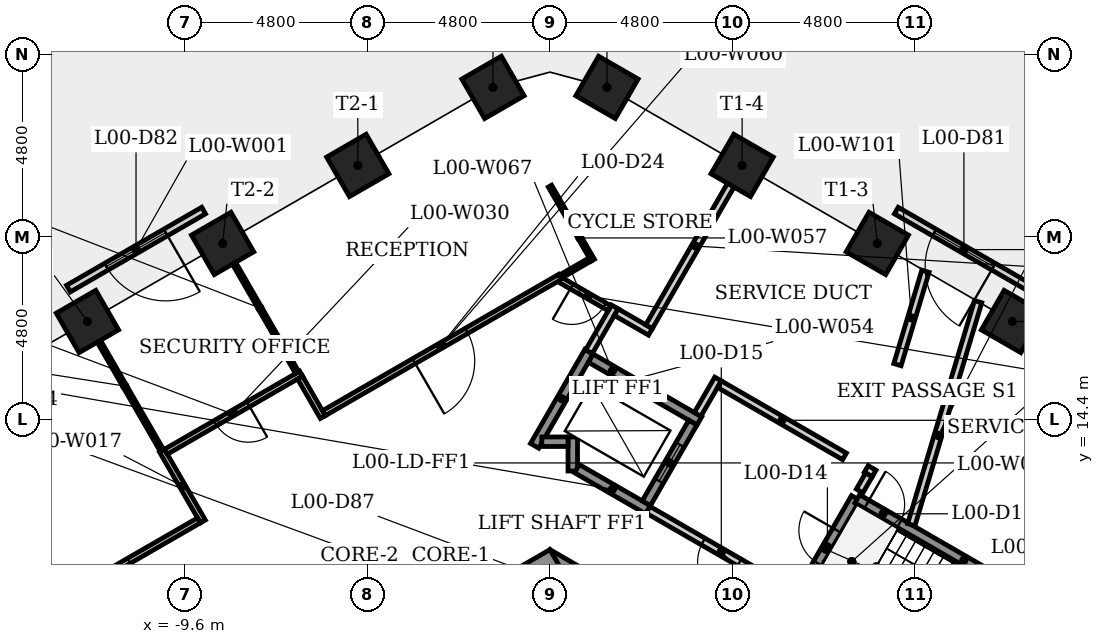
"""IFC4 building model, lengths in metres.
Left out: names, types, materials, properties, quantities, classifications, styles, units other than length and angle.
Written with IfcOpenShell. Run it as: python <this file> out.ifc"""

import sys

from ifc_helpers import new_model, si_unit, direction, frame, frame_2d, origin, origin_2d, place, context, subcontext, project, spatial, rectangle, extrude, element, fill, save


model = new_model("IFC4")
c1 = context("Model", 3, precision=1e-05, world=origin(), true_north=direction((0.0, 1.0)))
c2 = subcontext(c1, "Body", "Model", "MODEL_VIEW")
j1 = project(units=[si_unit("LENGTHUNIT", "METRE"), si_unit("PLANEANGLEUNIT", "RADIAN")], contexts=[c1])
p1 = place(None, origin())
s1 = spatial("IfcSite", under=j1, at=p1, CompositionType="ELEMENT")
p2 = place(p1, origin())
s2 = spatial("IfcBuilding", under=s1, at=p2, CompositionType="ELEMENT")
p3 = place(p2, origin())
s3 = spatial("IfcBuildingStorey", under=s2, at=p3, CompositionType="ELEMENT", Elevation=0.0)
p4 = place(p3, frame((9.3, 5.138, -0.5), z_axis=(0.0, 0.0, 1.0), x_axis=(-0.866023993627, 0.500002442456, 0.0)))
e1 = element("IfcWall", 1, at=p4, inside=s3, PredefinedType="SHEAR", context=c2, shape_type="SweptSolid", body=[
    extrude(rectangle(XDim=10.97, YDim=0.8, at=frame_2d((5.485, 0.0))), origin(), (0.0, 0.0, 1.0), 7.5),
])
p5 = place(p4, frame((8.21, 0.0, 0.5)))
e2 = element("IfcOpeningElement", 2, at=p5, cuts=e1, PredefinedType="OPENING", context=c2, shape_type="SweptSolid", body=[
    extrude(rectangle(XDim=0.9, YDim=2.1, at=frame_2d((0.45, 1.05))), frame((0.0, 0.41, 0.0), z_axis=(0.0, -1.0, 0.0), x_axis=(1.0, 0.0, 0.0)), (0.0, 0.0, 1.0), 0.82),
])
p6 = place(p4, frame((2.126, 0.0, 0.5)))
e3 = element("IfcOpeningElement", 3, at=p6, cuts=e1, PredefinedType="OPENING", context=c2, shape_type="SweptSolid", body=[
    extrude(rectangle(XDim=0.9, YDim=2.1, at=frame_2d((0.45, 1.05))), frame((0.0, 0.41, 0.0), z_axis=(0.0, -1.0, 0.0), x_axis=(1.0, 0.0, 0.0)), (0.0, 0.0, 1.0), 0.82),
])
p7 = place(p3, frame((0.2, 10.623, -0.5), z_axis=(0.0, 0.0, 1.0), x_axis=(-0.866023993627, -0.500002442456, 0.0)))
e4 = element("IfcWall", 4, at=p7, inside=s3, PredefinedType="SHEAR", context=c2, shape_type="SweptSolid", body=[
    extrude(rectangle(XDim=10.97, YDim=0.8, at=frame_2d((5.485, 0.0))), origin(), (0.0, 0.0, 1.0), 7.5),
])
p8 = place(p7, frame((6.877, 0.0, 0.5)))
e5 = element("IfcOpeningElement", 5, at=p8, cuts=e4, PredefinedType="OPENING", context=c2, shape_type="SweptSolid", body=[
    extrude(rectangle(XDim=0.9, YDim=2.1, at=frame_2d((0.45, 1.05))), frame((0.0, 0.41, 0.0), z_axis=(0.0, -1.0, 0.0), x_axis=(1.0, 0.0, 0.0)), (0.0, 0.0, 1.0), 0.82),
])
for number, where, z_axis, x_axis in (
    (6, (12.171, 16.973, -0.5), (0.0, 0.0, 1.0), (0.5, 0.866, 0.0)),
    (7, (8.614, 19.027, -0.5), (0.0, 0.0, 1.0), (0.5, 0.866, 0.0)),
    (8, (5.057, 21.08, -0.5), (0.0, 0.0, 1.0), (0.5, 0.866, 0.0)),
    (9, (1.5, 23.134, -0.5), (0.0, 0.0, 1.0), (0.5, 0.866, 0.0)),
    (10, (-1.5, 23.134, -0.5), (0.0, 0.0, 1.0), (-0.5, 0.866, 0.0)),
    (11, (-5.057, 21.08, -0.5), (0.0, 0.0, 1.0), (-0.5, 0.866, 0.0)),
    (12, (-8.614, 19.027, -0.5), (0.0, 0.0, 1.0), (-0.5, 0.866, 0.0)),
    (13, (-12.171, 16.973, -0.5), (0.0, 0.0, 1.0), (-0.5, 0.866, 0.0)),
):
    element("IfcColumn", number, at=place(p3, frame(where, z_axis=z_axis, x_axis=x_axis)), inside=s3, PredefinedType="COLUMN", context=c2, shape_type="SweptSolid", body=[
        extrude(rectangle(XDim=1.2, YDim=1.2, at=origin_2d()), origin(), (0.0, 0.0, 1.0), 7.5),
    ])
p9 = place(p3, frame((-9.114, 19.893, 0.0), z_axis=(0.0, 0.0, 1.0), x_axis=(-0.866036113234, -0.499981450231, 0.0)))
e14 = element("IfcWall", 14, at=p9, inside=s3, PredefinedType="SOLIDWALL", context=c2, shape_type="SweptSolid", body=[
    extrude(rectangle(XDim=4.107, YDim=0.2, at=frame_2d((2.054, 0.0))), origin(), (0.0, 0.0, 1.0), 7.0),
])
p10 = place(p9, frame((1.154, 0.0, 0.0)))
e15 = element("IfcOpeningElement", 15, at=p10, cuts=e14, PredefinedType="OPENING", context=c2, shape_type="SweptSolid", body=[
    extrude(rectangle(XDim=1.8, YDim=2.6, at=frame_2d((0.9, 1.3))), frame((0.0, 0.11, 0.0), z_axis=(0.0, -1.0, 0.0), x_axis=(1.0, 0.0, 0.0)), (0.0, 0.0, 1.0), 0.22),
])
p11 = place(p9, frame((1.154, 0.0, 3.0)))
e16 = element("IfcOpeningElement", 16, at=p11, cuts=e14, PredefinedType="OPENING", context=c2, shape_type="SweptSolid", body=[
    extrude(rectangle(XDim=1.8, YDim=2.2, at=frame_2d((0.9, 1.1))), frame((0.0, 0.11, 0.0), z_axis=(0.0, -1.0, 0.0), x_axis=(1.0, 0.0, 0.0)), (0.0, 0.0, 1.0), 0.22),
])
p12 = place(p3, frame((12.671, 17.839, 0.0), z_axis=(0.0, 0.0, 1.0), x_axis=(-0.865995510393, 0.500051773299, 0.0)))
e17 = element("IfcWall", 17, at=p12, inside=s3, PredefinedType="SOLIDWALL", context=c2, shape_type="SweptSolid", body=[
    extrude(rectangle(XDim=4.107, YDim=0.2, at=frame_2d((2.053, 0.0))), origin(), (0.0, 0.0, 1.0), 7.0),
])
p13 = place(p12, frame((1.154, 0.0, 0.0)))
e18 = element("IfcOpeningElement", 18, at=p13, cuts=e17, PredefinedType="OPENING", context=c2, shape_type="SweptSolid", body=[
    extrude(rectangle(XDim=1.8, YDim=2.6, at=frame_2d((0.9, 1.3))), frame((0.0, 0.11, 0.0), z_axis=(0.0, -1.0, 0.0), x_axis=(1.0, 0.0, 0.0)), (0.0, 0.0, 1.0), 0.22),
])
p14 = place(p12, frame((1.154, 0.0, 3.0)))
e19 = element("IfcOpeningElement", 19, at=p14, cuts=e17, PredefinedType="OPENING", context=c2, shape_type="SweptSolid", body=[
    extrude(rectangle(XDim=1.8, YDim=2.2, at=frame_2d((0.9, 1.1))), frame((0.0, 0.11, 0.0), z_axis=(0.0, -1.0, 0.0), x_axis=(1.0, 0.0, 0.0)), (0.0, 0.0, 1.0), 0.22),
])
p15 = place(p3, frame((-10.208, 13.574, 0.0), z_axis=(0.0, 0.0, 1.0), x_axis=(0.499961633463, -0.866047553582, 0.0)))
e20 = element("IfcWall", 20, at=p15, inside=s3, PredefinedType="PARTITIONING", context=c2, shape_type="SweptSolid", body=[
    extrude(rectangle(XDim=2.15, YDim=0.15, at=frame_2d((1.075, 0.0))), origin(), (0.0, 0.0, 1.0), 6.6),
])
p16 = place(p3, frame((-10.208, 13.574, 0.0), z_axis=(0.0, 0.0, 1.0), x_axis=(-0.500052695525, 0.865994977871, 0.0)))
e21 = element("IfcWall", 21, at=p16, inside=s3, PredefinedType="PARTITIONING", context=c2, shape_type="SweptSolid", body=[
    extrude(rectangle(XDim=3.925, YDim=0.1, at=frame_2d((1.962, 0.0))), origin(), (0.0, 0.0, 1.0), 6.6),
])
p17 = place(p3, frame((-9.236, 11.74, 0.0), z_axis=(0.0, 0.0, 1.0), x_axis=(-0.86604190943, -0.499971410293, 0.0)))
e22 = element("IfcWall", 22, at=p17, inside=s3, PredefinedType="PARTITIONING", context=c2, shape_type="SweptSolid", body=[
    extrude(rectangle(XDim=8.064, YDim=0.15, at=frame_2d((4.032, 0.0))), origin(), (0.0, 0.0, 1.0), 6.6),
])
p18 = place(p17, frame((2.132, 0.0, 0.0)))
e23 = element("IfcOpeningElement", 23, at=p18, cuts=e22, PredefinedType="OPENING", context=c2, shape_type="SweptSolid", body=[
    extrude(rectangle(XDim=1.6, YDim=2.1, at=frame_2d((0.8, 1.05))), frame((0.0, 0.085, 0.0), z_axis=(0.0, -1.0, 0.0), x_axis=(1.0, 0.0, 0.0)), (0.0, 0.0, 1.0), 0.17),
])
p19 = place(p3, frame((-6.549, 15.6, 0.0), z_axis=(0.0, 0.0, 1.0), x_axis=(-0.866036113234, -0.499981450231, 0.0)))
e24 = element("IfcWall", 24, at=p19, inside=s3, PredefinedType="PARTITIONING", context=c2, shape_type="SweptSolid", body=[
    extrude(rectangle(XDim=4.107, YDim=0.15, at=frame_2d((2.054, 0.0))), origin(), (0.0, 0.0, 1.0), 6.6),
])
p20 = place(p19, frame((1.606, 0.0, 0.0)))
e25 = element("IfcOpeningElement", 25, at=p20, cuts=e24, PredefinedType="OPENING", context=c2, shape_type="SweptSolid", body=[
    extrude(rectangle(XDim=1.0, YDim=2.1, at=frame_2d((0.5, 1.05))), frame((0.0, 0.085, 0.0), z_axis=(0.0, -1.0, 0.0), x_axis=(1.0, 0.0, 0.0)), (0.0, 0.0, 1.0), 0.17),
])
p21 = place(p3, frame((-6.651, 15.628, 0.0), z_axis=(0.0, 0.0, 1.0), x_axis=(-0.499979109433, 0.866037464623, 0.0)))
e26 = element("IfcWall", 26, at=p21, inside=s3, PredefinedType="PARTITIONING", context=c2, shape_type="SweptSolid", body=[
    extrude(rectangle(XDim=3.925, YDim=0.1, at=frame_2d((1.962, 0.0))), origin(), (0.0, 0.0, 1.0), 6.6),
])
p22 = place(p3, frame((-5.976, 14.458, 0.0), z_axis=(0.0, 0.0, 1.0), x_axis=(-0.500033551112, 0.866006032174, 0.0)))
e27 = element("IfcWall", 27, at=p22, inside=s3, PredefinedType="PARTITIONING", context=c2, shape_type="SweptSolid", body=[
    extrude(rectangle(XDim=1.2, YDim=0.15, at=frame_2d((0.6, 0.0))), origin(), (0.0, 0.0, 1.0), 6.6),
])
p23 = place(p3, frame((-0.403, 13.702, 0.0), z_axis=(0.0, 0.0, 1.0), x_axis=(0.499976111731, 0.866039195244, 0.0)))
e28 = element("IfcWall", 28, at=p23, inside=s3, PredefinedType="SHEAR", context=c2, shape_type="SweptSolid", body=[
    extrude(rectangle(XDim=2.861, YDim=0.25, at=frame_2d((1.43, 0.0))), origin(), (0.0, 0.0, 1.0), 6.6),
])
p24 = place(p3, frame((0.0, 20.536, 0.0), z_axis=(0.0, 0.0, 1.0), x_axis=(0.500013631625, -0.866017533419, 0.0)))
e29 = element("IfcWall", 29, at=p24, inside=s3, PredefinedType="PARTITIONING", context=c2, shape_type="SweptSolid", body=[
    extrude(rectangle(XDim=2.25, YDim=0.1, at=frame_2d((1.125, 0.0))), origin(), (0.0, 0.0, 1.0), 6.6),
])
p25 = place(p3, frame((0.265, 18.149, 0.0), z_axis=(0.0, 0.0, 1.0), x_axis=(-0.866029770671, -0.499992436255, 0.0)))
e30 = element("IfcWall", 30, at=p25, inside=s3, PredefinedType="PARTITIONING", context=c2, shape_type="SweptSolid", body=[
    extrude(rectangle(XDim=7.175, YDim=0.15, at=frame_2d((3.588, 0.0))), origin(), (0.0, 0.0, 1.0), 6.6),
])
p26 = place(p25, frame((2.84, 0.0, 0.0)))
e31 = element("IfcOpeningElement", 31, at=p26, cuts=e30, PredefinedType="OPENING", context=c2, shape_type="SweptSolid", body=[
    extrude(rectangle(XDim=1.6, YDim=2.1, at=frame_2d((0.8, 1.05))), frame((0.0, 0.085, 0.0), z_axis=(0.0, -1.0, 0.0), x_axis=(1.0, 0.0, 0.0)), (0.0, 0.0, 1.0), 0.17),
])
p27 = place(p3, frame((0.6, 13.039, 0.0), z_axis=(0.0, 0.0, 1.0), x_axis=(0.0, 1.0, 0.0)))
e32 = element("IfcWall", 32, at=p27, inside=s3, PredefinedType="SHEAR", context=c2, shape_type="SweptSolid", body=[
    extrude(rectangle(XDim=0.896, YDim=0.25, at=frame_2d((0.448, 0.0))), origin(), (0.0, 0.0, 1.0), 6.6),
])
p28 = place(p3, frame((0.475, 13.81, 0.0), z_axis=(0.0, 0.0, 1.0), x_axis=(-1.0, 0.0, 0.0)))
e33 = element("IfcWall", 33, at=p28, inside=s3, PredefinedType="SHEAR", context=c2, shape_type="SweptSolid", body=[
    extrude(rectangle(XDim=0.691, YDim=0.25, at=frame_2d((0.345, 0.0))), origin(), (0.0, 0.0, 1.0), 7.0),
])
p29 = place(p3, frame((1.027, 16.179, 0.0), z_axis=(0.0, 0.0, 1.0), x_axis=(0.499924531544, 0.866068971134, 0.0)))
e34 = element("IfcWall", 34, at=p29, inside=s3, PredefinedType="PLUMBINGWALL", context=c2, shape_type="SweptSolid", body=[
    extrude(rectangle(XDim=1.36, YDim=0.2, at=frame_2d((0.68, 0.0))), origin(), (0.0, 0.0, 1.0), 6.6),
])
p30 = place(p3, frame((1.073, 16.008, 0.0), z_axis=(0.0, 0.0, 1.0), x_axis=(0.866040211805, -0.499974350878, 0.0)))
e35 = element("IfcWall", 35, at=p30, inside=s3, PredefinedType="SHEAR", context=c2, shape_type="SweptSolid", body=[
    extrude(rectangle(XDim=3.3, YDim=0.25, at=frame_2d((1.65, 0.0))), origin(), (0.0, 0.0, 1.0), 6.6),
])
p31 = place(p3, frame((1.057, 18.606, 0.0), z_axis=(0.0, 0.0, 1.0), x_axis=(-0.8659498828, -0.500130783375, 0.0)))
e36 = element("IfcWall", 36, at=p31, inside=s3, PredefinedType="PARTITIONING", context=c2, shape_type="SweptSolid", body=[
    extrude(rectangle(XDim=0.914, YDim=0.1, at=frame_2d((0.457, 0.0))), origin(), (0.0, 0.0, 1.0), 6.6),
])
p32 = place(p3, frame((1.743, 17.22, 0.0), z_axis=(0.0, 0.0, 1.0), x_axis=(0.86599391852, -0.500054530113, 0.0)))
e37 = element("IfcWall", 37, at=p32, inside=s3, PredefinedType="PLUMBINGWALL", context=c2, shape_type="SweptSolid", body=[
    extrude(rectangle(XDim=1.04, YDim=0.2, at=frame_2d((0.52, 0.0))), origin(), (0.0, 0.0, 1.0), 6.6),
])
p33 = place(p3, frame((1.57, 17.32, 0.0), z_axis=(0.0, 0.0, 1.0), x_axis=(-0.866031848217, 0.499988837749, 0.0)))
e38 = element("IfcWall", 38, at=p33, inside=s3, PredefinedType="PARTITIONING", context=c2, shape_type="SweptSolid", body=[
    extrude(rectangle(XDim=1.507, YDim=0.15, at=frame_2d((0.754, 0.0))), origin(), (0.0, 0.0, 1.0), 6.6),
])
p34 = place(p33, frame((0.154, 0.0, 0.0)))
e39 = element("IfcOpeningElement", 39, at=p34, cuts=e38, PredefinedType="OPENING", context=c2, shape_type="SweptSolid", body=[
    extrude(rectangle(XDim=1.0, YDim=2.1, at=frame_2d((0.5, 1.05))), frame((0.0, 0.085, 0.0), z_axis=(0.0, -1.0, 0.0), x_axis=(1.0, 0.0, 0.0)), (0.0, 0.0, 1.0), 0.17),
])
p35 = place(p3, frame((2.581, 12.02, 0.0), z_axis=(0.0, 0.0, 1.0), x_axis=(-0.86603892542, 0.499976579108, 0.0)))
e40 = element("IfcWall", 40, at=p35, inside=s3, PredefinedType="SHEAR", context=c2, shape_type="SweptSolid", body=[
    extrude(rectangle(XDim=2.162, YDim=0.25, at=frame_2d((1.081, 0.0))), origin(), (0.0, 0.0, 1.0), 6.6),
])
p36 = place(p3, frame((2.535, 12.191, 0.0), z_axis=(0.0, 0.0, 1.0), x_axis=(0.500061746146, 0.865989751695, 0.0)))
e41 = element("IfcWall", 41, at=p36, inside=s3, PredefinedType="SHEAR", context=c2, shape_type="SweptSolid", body=[
    extrude(rectangle(XDim=2.45, YDim=0.25, at=frame_2d((1.225, 0.0))), origin(), (0.0, 0.0, 1.0), 7.0),
])
p37 = place(p36, frame((0.675, 0.0, 0.0)))
e42 = element("IfcOpeningElement", 42, at=p37, cuts=e41, PredefinedType="OPENING", context=c2, shape_type="SweptSolid", body=[
    extrude(rectangle(XDim=1.1, YDim=2.1, at=frame_2d((0.55, 1.05))), frame((0.0, 0.135, 0.0), z_axis=(0.0, -1.0, 0.0), x_axis=(1.0, 0.0, 0.0)), (0.0, 0.0, 1.0), 0.27),
])
p38 = place(p3, frame((2.607, 16.837, 0.0), z_axis=(0.0, 0.0, 1.0), x_axis=(0.500002801628, 0.866023786258, 0.0)))
e43 = element("IfcWall", 43, at=p38, inside=s3, PredefinedType="PLUMBINGWALL", context=c2, shape_type="SweptSolid", body=[
    extrude(rectangle(XDim=4.9, YDim=0.2, at=frame_2d((2.45, 0.0))), origin(), (0.0, 0.0, 1.0), 6.6),
])
p39 = place(p3, frame((3.885, 14.529, 0.0), z_axis=(0.0, 0.0, 1.0), x_axis=(0.499997628298, 0.866026773083, 0.0)))
e44 = element("IfcWall", 44, at=p39, inside=s3, PredefinedType="PLUMBINGWALL", context=c2, shape_type="SweptSolid", body=[
    extrude(rectangle(XDim=1.075, YDim=0.2, at=frame_2d((0.538, 0.0))), origin(), (0.0, 0.0, 1.0), 6.6),
])
p40 = place(p3, frame((4.459, 15.323, 0.0), z_axis=(0.0, 0.0, 1.0), x_axis=(0.86601654697, -0.500015340139, 0.0)))
e45 = element("IfcWall", 45, at=p40, inside=s3, PredefinedType="PLUMBINGWALL", context=c2, shape_type="SweptSolid", body=[
    extrude(rectangle(XDim=3.8, YDim=0.2, at=frame_2d((1.9, 0.0))), origin(), (0.0, 0.0, 1.0), 6.6),
])
p41 = place(p3, frame((6.435, 9.795, 0.0), z_axis=(0.0, 0.0, 1.0), x_axis=(-0.866012907634, 0.500021643343, 0.0)))
e46 = element("IfcWall", 46, at=p41, inside=s3, PredefinedType="PARTITIONING", context=c2, shape_type="SweptSolid", body=[
    extrude(rectangle(XDim=4.45, YDim=0.2, at=frame_2d((2.225, 0.0))), origin(), (0.0, 0.0, 1.0), 6.6),
])
p42 = place(p41, frame((1.675, 0.0, 0.0)))
e47 = element("IfcOpeningElement", 47, at=p42, cuts=e46, PredefinedType="OPENING", context=c2, shape_type="SweptSolid", body=[
    extrude(rectangle(XDim=1.1, YDim=2.1, at=frame_2d((0.55, 1.05))), frame((0.0, 0.11, 0.0), z_axis=(0.0, -1.0, 0.0), x_axis=(1.0, 0.0, 0.0)), (0.0, 0.0, 1.0), 0.22),
])
p43 = place(p3, frame((6.48, 9.624, 0.0), z_axis=(0.0, 0.0, 1.0), x_axis=(0.500004234368, 0.866022959057, 0.0)))
e48 = element("IfcWall", 48, at=p43, inside=s3, PredefinedType="SHEAR", context=c2, shape_type="SweptSolid", body=[
    extrude(rectangle(XDim=3.125, YDim=0.25, at=frame_2d((1.562, 0.0))), origin(), (0.0, 0.0, 1.0), 6.6),
])
p44 = place(p43, frame((1.14, 0.0, 0.0)))
e49 = element("IfcOpeningElement", 49, at=p44, cuts=e48, PredefinedType="OPENING", context=c2, shape_type="SweptSolid", body=[
    extrude(rectangle(XDim=1.0, YDim=2.1, at=frame_2d((0.5, 1.05))), frame((0.0, 0.135, 0.0), z_axis=(0.0, -1.0, 0.0), x_axis=(1.0, 0.0, 0.0)), (0.0, 0.0, 1.0), 0.27),
])
p45 = place(p3, frame((8.086, 12.306, 0.0), z_axis=(0.0, 0.0, 1.0), x_axis=(0.866027988781, -0.499995522627, 0.0)))
e50 = element("IfcWall", 50, at=p45, inside=s3, PredefinedType="SHEAR", context=c2, shape_type="SweptSolid", body=[
    extrude(rectangle(XDim=6.475, YDim=0.25, at=frame_2d((3.238, 0.0))), origin(), (0.0, 0.0, 1.0), 6.6),
])
p46 = place(p45, frame((0.285, 0.0, 0.0)))
e51 = element("IfcOpeningElement", 51, at=p46, cuts=e50, PredefinedType="OPENING", context=c2, shape_type="SweptSolid", body=[
    extrude(rectangle(XDim=1.0, YDim=2.1, at=frame_2d((0.5, 1.05))), frame((0.0, 0.135, 0.0), z_axis=(0.0, -1.0, 0.0), x_axis=(1.0, 0.0, 0.0)), (0.0, 0.0, 1.0), 0.27),
])
p47 = place(p3, frame((8.322, 13.093, 0.0), z_axis=(0.0, 0.0, 1.0), x_axis=(0.865658885915, -0.500634290912, 0.0)))
e52 = element("IfcWall", 52, at=p47, inside=s3, PredefinedType="PARTITIONING", context=c2, shape_type="SweptSolid", body=[
    extrude(rectangle(XDim=0.24, YDim=0.2, at=frame_2d((0.12, 0.0))), origin(), (0.0, 0.0, 1.0), 6.6),
])
p48 = place(p3, frame((8.393, 12.937, 0.0), z_axis=(0.0, 0.0, 1.0), x_axis=(-0.499895202697, -0.866085900082, 0.0)))
e53 = element("IfcWall", 53, at=p48, inside=s3, PredefinedType="PARTITIONING", context=c2, shape_type="SweptSolid", body=[
    extrude(rectangle(XDim=0.489, YDim=0.2, at=frame_2d((0.245, 0.0))), origin(), (0.0, 0.0, 1.0), 6.6),
])
p49 = place(p3, frame((9.508, 11.625, 0.0), z_axis=(0.0, 0.0, 1.0), x_axis=(0.286880018175, 0.957966520904, 0.0)))
e54 = element("IfcWall", 54, at=p49, inside=s3, PredefinedType="PLUMBINGWALL", context=c2, shape_type="SweptSolid", body=[
    extrude(rectangle(XDim=6.128, YDim=0.2, at=frame_2d((3.064, 0.0))), origin(), (0.0, 0.0, 1.0), 6.6),
])
p50 = place(p3, frame((9.88, 18.296, 0.0), z_axis=(0.0, 0.0, 1.0), x_axis=(-0.286850320116, -0.957975414011, 0.0)))
e55 = element("IfcWall", 55, at=p50, inside=s3, PredefinedType="PLUMBINGWALL", context=c2, shape_type="SweptSolid", body=[
    extrude(rectangle(XDim=2.566, YDim=0.2, at=frame_2d((1.283, 0.0))), origin(), (0.0, 0.0, 1.0), 6.6),
])
p51 = place(p10, origin())
e56 = element("IfcDoor", 56, at=p51, inside=s3, OperationType="DOUBLE_DOOR_DOUBLE_SWING", PredefinedType="DOOR", context=c2, shape_type="SweptSolid", body=[
    extrude(rectangle(XDim=1.8, YDim=2.6, at=frame_2d((0.9, 1.3))), frame((0.0, 0.025, 0.0), z_axis=(0.0, -1.0, 0.0), x_axis=(1.0, 0.0, 0.0)), (0.0, 0.0, 1.0), 0.05),
])
fill(e15, e56)
p52 = place(p11, origin())
e57 = element("IfcWindow", 57, at=p52, inside=s3, PartitioningType="SINGLE_PANEL", PredefinedType="WINDOW", context=c2, shape_type="SweptSolid", body=[
    extrude(rectangle(XDim=1.8, YDim=2.2, at=frame_2d((0.9, 1.1))), frame((0.0, 0.03, 0.0), z_axis=(0.0, -1.0, 0.0), x_axis=(1.0, 0.0, 0.0)), (0.0, 0.0, 1.0), 0.06),
])
fill(e16, e57)
p53 = place(p13, origin())
e58 = element("IfcDoor", 58, at=p53, inside=s3, OperationType="DOUBLE_DOOR_DOUBLE_SWING", PredefinedType="DOOR", context=c2, shape_type="SweptSolid", body=[
    extrude(rectangle(XDim=1.8, YDim=2.6, at=frame_2d((0.9, 1.3))), frame((0.0, 0.025, 0.0), z_axis=(0.0, -1.0, 0.0), x_axis=(1.0, 0.0, 0.0)), (0.0, 0.0, 1.0), 0.05),
])
fill(e18, e58)
p54 = place(p14, origin())
e59 = element("IfcWindow", 59, at=p54, inside=s3, PartitioningType="SINGLE_PANEL", PredefinedType="WINDOW", context=c2, shape_type="SweptSolid", body=[
    extrude(rectangle(XDim=1.8, YDim=2.2, at=frame_2d((0.9, 1.1))), frame((0.0, 0.03, 0.0), z_axis=(0.0, -1.0, 0.0), x_axis=(1.0, 0.0, 0.0)), (0.0, 0.0, 1.0), 0.06),
])
fill(e19, e59)
p55 = place(p46, origin())
e60 = element("IfcDoor", 60, at=p55, inside=s3, OperationType="SINGLE_SWING_LEFT", PredefinedType="DOOR", context=c2, shape_type="SweptSolid", body=[
    extrude(rectangle(XDim=1.0, YDim=2.1, at=frame_2d((0.5, 1.05))), frame((0.0, 0.025, 0.0), z_axis=(0.0, -1.0, 0.0), x_axis=(1.0, 0.0, 0.0)), (0.0, 0.0, 1.0), 0.05),
])
fill(e51, e60)
p56 = place(p44, origin())
e61 = element("IfcDoor", 61, at=p56, inside=s3, OperationType="SINGLE_SWING_RIGHT", PredefinedType="DOOR", context=c2, shape_type="SweptSolid", body=[
    extrude(rectangle(XDim=1.0, YDim=2.1, at=frame_2d((0.5, 1.05))), frame((0.0, 0.025, 0.0), z_axis=(0.0, -1.0, 0.0), x_axis=(1.0, 0.0, 0.0)), (0.0, 0.0, 1.0), 0.05),
])
fill(e49, e61)
p57 = place(p42, origin())
e62 = element("IfcDoor", 62, at=p57, inside=s3, OperationType="SINGLE_SWING_LEFT", PredefinedType="DOOR", context=c2, shape_type="SweptSolid", body=[
    extrude(rectangle(XDim=1.1, YDim=2.1, at=frame_2d((0.55, 1.05))), frame((0.0, 0.025, 0.0), z_axis=(0.0, -1.0, 0.0), x_axis=(1.0, 0.0, 0.0)), (0.0, 0.0, 1.0), 0.05),
])
fill(e47, e62)
p58 = place(p37, origin())
e63 = element("IfcDoor", 63, at=p58, inside=s3, OperationType="SLIDING_TO_LEFT", PredefinedType="DOOR", context=c2, shape_type="SweptSolid", body=[
    extrude(rectangle(XDim=1.1, YDim=2.1, at=frame_2d((0.55, 1.05))), frame((0.0, 0.025, 0.0), z_axis=(0.0, -1.0, 0.0), x_axis=(1.0, 0.0, 0.0)), (0.0, 0.0, 1.0), 0.05),
])
fill(e42, e63)
p59 = place(p26, origin())
e64 = element("IfcDoor", 64, at=p59, inside=s3, OperationType="SINGLE_SWING_RIGHT", PredefinedType="DOOR", context=c2, shape_type="SweptSolid", body=[
    extrude(rectangle(XDim=1.6, YDim=2.1, at=frame_2d((0.8, 1.05))), frame((0.0, 0.025, 0.0), z_axis=(0.0, -1.0, 0.0), x_axis=(1.0, 0.0, 0.0)), (0.0, 0.0, 1.0), 0.05),
])
fill(e31, e64)
p60 = place(p20, origin())
e65 = element("IfcDoor", 65, at=p60, inside=s3, OperationType="SINGLE_SWING_LEFT", PredefinedType="DOOR", context=c2, shape_type="SweptSolid", body=[
    extrude(rectangle(XDim=1.0, YDim=2.1, at=frame_2d((0.5, 1.05))), frame((0.0, 0.025, 0.0), z_axis=(0.0, -1.0, 0.0), x_axis=(1.0, 0.0, 0.0)), (0.0, 0.0, 1.0), 0.05),
])
fill(e25, e65)
p61 = place(p18, origin())
e66 = element("IfcDoor", 66, at=p61, inside=s3, OperationType="SINGLE_SWING_RIGHT", PredefinedType="DOOR", context=c2, shape_type="SweptSolid", body=[
    extrude(rectangle(XDim=1.6, YDim=2.1, at=frame_2d((0.8, 1.05))), frame((0.0, 0.025, 0.0), z_axis=(0.0, -1.0, 0.0), x_axis=(1.0, 0.0, 0.0)), (0.0, 0.0, 1.0), 0.05),
])
fill(e23, e66)
p62 = place(p34, origin())
e67 = element("IfcDoor", 67, at=p62, inside=s3, OperationType="SINGLE_SWING_RIGHT", PredefinedType="DOOR", context=c2, shape_type="SweptSolid", body=[
    extrude(rectangle(XDim=1.0, YDim=2.1, at=frame_2d((0.5, 1.05))), frame((0.0, 0.025, 0.0), z_axis=(0.0, -1.0, 0.0), x_axis=(1.0, 0.0, 0.0)), (0.0, 0.0, 1.0), 0.05),
])
fill(e39, e67)
save(model, sys.argv[1])
